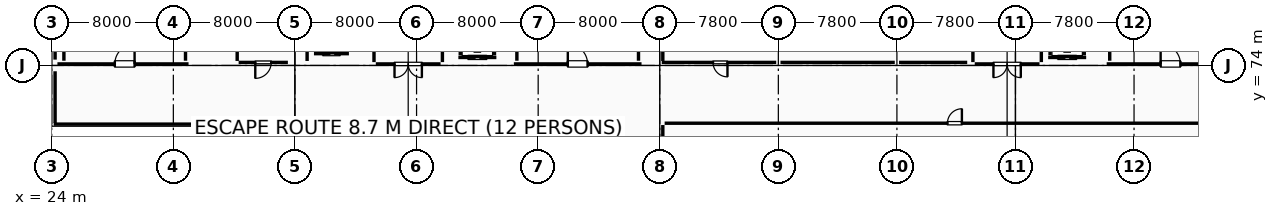
"""IFC4 building model, lengths in metres.
Left out: names, types, materials, properties, quantities, classifications, styles, units other than length and angle.
Written with IfcOpenShell. Run it as: python <this file> out.ifc"""

import sys

from ifc_helpers import new_model, si_unit, direction, frame, frame_2d, origin, origin_2d, place, context, subcontext, project, spatial, rectangle, i_section, extrude, element, fill, save


model = new_model("IFC4")
c1 = context("Model", 3, precision=1e-05, world=origin(), true_north=direction((0.0, 1.0)))
c2 = subcontext(c1, "Body", "Model", "MODEL_VIEW")
j1 = project(units=[si_unit("LENGTHUNIT", "METRE"), si_unit("PLANEANGLEUNIT", "RADIAN")], contexts=[c1])
p1 = place(None, origin())
s1 = spatial("IfcSite", under=j1, at=p1, CompositionType="ELEMENT")
p2 = place(p1, origin())
s2 = spatial("IfcBuilding", under=s1, at=p2, CompositionType="ELEMENT")
p3 = place(p2, frame((0.0, 0.0, 5.4)))
s3 = spatial("IfcBuildingStorey", under=s2, at=p3, CompositionType="ELEMENT", Elevation=5.4)
p4 = place(p3, frame((24.0, 74.0, 0.0), z_axis=(0.0, 0.0, 1.0), x_axis=(1.0, 0.0, 0.0)))
e1 = element("IfcColumn", 1, at=p4, inside=s3, PredefinedType="COLUMN", context=c2, shape_type="SweptSolid", body=[
    extrude(rectangle(XDim=0.75, YDim=0.75, at=origin_2d()), origin(), (0.0, 0.0, 1.0), 4.8),
])
p5 = place(p3, frame((40.0, 74.0, 0.0), z_axis=(0.0, 0.0, 1.0), x_axis=(1.0, 0.0, 0.0)))
e2 = element("IfcColumn", 2, at=p5, inside=s3, PredefinedType="COLUMN", context=c2, shape_type="SweptSolid", body=[
    extrude(rectangle(XDim=0.9, YDim=0.9, at=origin_2d()), origin(), (0.0, 0.0, 1.0), 4.8),
])
for number, where, z_axis, x_axis in (
    (3, (64.0, 74.0, 0.0), (0.0, 0.0, 1.0), (1.0, 0.0, 0.0)),
    (4, (71.8, 74.0, 0.0), (0.0, 0.0, 1.0), (1.0, 0.0, 0.0)),
    (5, (79.6, 74.0, 0.0), (0.0, 0.0, 1.0), (1.0, 0.0, 0.0)),
):
    element("IfcColumn", number, at=place(p3, frame(where, z_axis=z_axis, x_axis=x_axis)), inside=s3, PredefinedType="COLUMN", context=c2, shape_type="SweptSolid", body=[
        extrude(i_section(OverallWidth=0.25, OverallDepth=0.45, WebThickness=0.011, FlangeThickness=0.014, FilletRadius=0.015, at=origin_2d()), origin(), (0.0, 0.0, 1.0), 4.8),
    ])
p6 = place(p3, frame((40.0, 69.8, 0.0), z_axis=(0.0, 0.0, 1.0), x_axis=(1.0, 0.0, 0.0)))
e6 = element("IfcColumn", 6, at=p6, inside=s3, PredefinedType="COLUMN", context=c2, shape_type="SweptSolid", body=[
    extrude(i_section(OverallWidth=0.25, OverallDepth=0.35, WebThickness=0.01, FlangeThickness=0.012, FilletRadius=0.012, at=origin_2d()), origin(), (0.0, 0.0, 1.0), 4.76),
])
p7 = place(p3, frame((54.0, 69.8, 0.0), z_axis=(0.0, 0.0, 1.0), x_axis=(1.0, 0.0, 0.0)))
e7 = element("IfcColumn", 7, at=p7, inside=s3, PredefinedType="COLUMN", context=c2, shape_type="SweptSolid", body=[
    extrude(i_section(OverallWidth=0.25, OverallDepth=0.35, WebThickness=0.01, FlangeThickness=0.012, FilletRadius=0.012, at=origin_2d()), origin(), (0.0, 0.0, 1.0), 4.8),
])
for number, where, z_axis, x_axis in (
    (8, (54.24, 65.885, 0.0), (0.0, 0.0, 1.0), (0.0, 1.0, 0.0)),
    (9, (40.24, 65.885, 0.0), (0.0, 0.0, 1.0), (0.0, 1.0, 0.0)),
):
    element("IfcWall", number, at=place(p3, frame(where, z_axis=z_axis, x_axis=x_axis)), inside=s3, PredefinedType="PARAPET", context=c2, shape_type="SweptSolid", body=[
        extrude(rectangle(XDim=3.73, YDim=0.18, at=frame_2d((1.865, 0.0))), origin(), (0.0, 0.0, 1.0), 0.88),
    ])
p8 = place(p3, frame((39.867, 70.14, 0.0), z_axis=(0.0, 0.0, 1.0), x_axis=(-1.0, 0.0, 0.0)))
e10 = element("IfcWall", 10, at=p8, inside=s3, PredefinedType="ELEMENTEDWALL", context=c2, shape_type="SweptSolid", body=[
    extrude(rectangle(XDim=15.737, YDim=0.24, at=frame_2d((7.869, 0.0))), origin(), (0.0, 0.0, 1.0), 4.54),
])
p9 = place(p8, frame((7.318, 0.0, 0.95)))
e11 = element("IfcOpeningElement", 11, at=p9, cuts=e10, PredefinedType="OPENING", context=c2, shape_type="SweptSolid", body=[
    extrude(rectangle(XDim=1.1, YDim=1.2, at=frame_2d((0.55, 0.6))), frame((0.0, 0.13, 0.0), z_axis=(0.0, -1.0, 0.0), x_axis=(1.0, 0.0, 0.0)), (0.0, 0.0, 1.0), 0.26),
])
p10 = place(p3, frame((24.22, 70.21, 0.0), z_axis=(0.0, 0.0, 1.0), x_axis=(0.0, 1.0, 0.0)))
e12 = element("IfcWall", 12, at=p10, inside=s3, PredefinedType="STANDARD", context=c2, shape_type="SweptSolid", body=[
    extrude(rectangle(XDim=3.407, YDim=0.4, at=frame_2d((1.704, 0.0))), origin(), (0.0, 0.0, 1.0), 4.025),
])
p11 = place(p10, frame((1.154, 0.0, 0.95)))
e13 = element("IfcOpeningElement", 13, at=p11, cuts=e12, PredefinedType="OPENING", context=c2, shape_type="SweptSolid", body=[
    extrude(rectangle(XDim=1.1, YDim=1.5, at=frame_2d((0.55, 0.75))), frame((0.0, 0.21, 0.0), z_axis=(0.0, -1.0, 0.0), x_axis=(1.0, 0.0, 0.0)), (0.0, 0.0, 1.0), 0.42),
])
p12 = place(p3, frame((24.22, 74.383, 0.0), z_axis=(0.0, 0.0, 1.0), x_axis=(0.0, 1.0, 0.0)))
e14 = element("IfcWall", 14, at=p12, inside=s3, PredefinedType="STANDARD", context=c2, shape_type="SweptSolid", body=[
    extrude(rectangle(XDim=8.284, YDim=0.4, at=frame_2d((4.142, 0.0))), origin(), (0.0, 0.0, 1.0), 4.075),
])
p13 = place(p12, frame((3.592, 0.0, 0.95)))
e15 = element("IfcOpeningElement", 15, at=p13, cuts=e14, PredefinedType="OPENING", context=c2, shape_type="SweptSolid", body=[
    extrude(rectangle(XDim=1.1, YDim=1.8, at=frame_2d((0.55, 0.9))), frame((0.0, 0.21, 0.0), z_axis=(0.0, -1.0, 0.0), x_axis=(1.0, 0.0, 0.0)), (0.0, 0.0, 1.0), 0.42),
])
p14 = place(p3, frame((54.4, 74.1, 0.0), z_axis=(0.0, 0.0, 1.0), x_axis=(1.0, 0.0, 0.0)))
e16 = element("IfcWall", 16, at=p14, inside=s3, PredefinedType="SHEAR", context=c2, shape_type="SweptSolid", body=[
    extrude(rectangle(XDim=8.4, YDim=0.4, at=frame_2d((4.2, 0.0))), origin(), (0.0, 0.0, 1.0), 4.54),
])
p15 = place(p14, frame((3.55, 0.0, 0.0)))
e17 = element("IfcOpeningElement", 17, at=p15, cuts=e16, PredefinedType="OPENING", context=c2, shape_type="SweptSolid", body=[
    extrude(rectangle(XDim=1.3, YDim=2.15, at=frame_2d((0.65, 1.075))), frame((0.0, 0.21, 0.0), z_axis=(0.0, -1.0, 0.0), x_axis=(1.0, 0.0, 0.0)), (0.0, 0.0, 1.0), 0.42),
])
for number, where, z_axis, x_axis in (
    (18, (62.6, 74.31, 0.0), (0.0, 0.0, 1.0), (0.0, 1.0, 0.0)),
    (19, (54.6, 82.69, 0.0), (0.0, 0.0, 1.0), (0.0, -1.0, 0.0)),
):
    element("IfcWall", number, at=place(p3, frame(where, z_axis=z_axis, x_axis=x_axis)), inside=s3, PredefinedType="SHEAR", context=c2, shape_type="SweptSolid", body=[
        extrude(rectangle(XDim=8.38, YDim=0.4, at=frame_2d((4.19, 0.0))), origin(), (0.0, 0.0, 1.0), 4.54),
    ])
p16 = place(p3, frame((50.75, 74.525, 0.0), z_axis=(0.0, 0.0, 1.0), x_axis=(1.0, 0.0, 0.0)))
e20 = element("IfcWall", 20, at=p16, inside=s3, PredefinedType="STANDARD", context=c2, shape_type="SweptSolid", body=[
    extrude(rectangle(XDim=2.5, YDim=0.25, at=frame_2d((1.25, 0.0))), origin(), (0.0, 0.0, 1.0), 4.53),
])
p17 = place(p16, frame((0.65, 0.0, 0.0)))
e21 = element("IfcOpeningElement", 21, at=p17, cuts=e20, PredefinedType="OPENING", context=c2, shape_type="SweptSolid", body=[
    extrude(rectangle(XDim=1.2, YDim=2.05, at=frame_2d((0.6, 1.025))), frame((0.0, 0.135, 0.0), z_axis=(0.0, -1.0, 0.0), x_axis=(1.0, 0.0, 0.0)), (0.0, 0.0, 1.0), 0.27),
])
for number, where, z_axis, x_axis in (
    (22, (53.125, 74.66, 0.0), (0.0, 0.0, 1.0), (0.0, 1.0, 0.0)),
    (23, (50.875, 76.94, 0.0), (0.0, 0.0, 1.0), (0.0, -1.0, 0.0)),
):
    element("IfcWall", number, at=place(p3, frame(where, z_axis=z_axis, x_axis=x_axis)), inside=s3, PredefinedType="STANDARD", context=c2, shape_type="SweptSolid", body=[
        extrude(rectangle(XDim=2.28, YDim=0.25, at=frame_2d((1.14, 0.0))), origin(), (0.0, 0.0, 1.0), 4.53),
    ])
p18 = place(p3, frame((41.25, 74.775, 0.0), z_axis=(0.0, 0.0, 1.0), x_axis=(1.0, 0.0, 0.0)))
e24 = element("IfcWall", 24, at=p18, inside=s3, PredefinedType="STANDARD", context=c2, shape_type="SweptSolid", body=[
    extrude(rectangle(XDim=2.3, YDim=0.25, at=frame_2d((1.15, 0.0))), origin(), (0.0, 0.0, 1.0), 4.53),
])
p19 = place(p18, frame((0.6, 0.0, 0.0)))
e25 = element("IfcOpeningElement", 25, at=p19, cuts=e24, PredefinedType="OPENING", context=c2, shape_type="SweptSolid", body=[
    extrude(rectangle(XDim=1.1, YDim=2.15, at=frame_2d((0.55, 1.075))), frame((0.0, 0.135, 0.0), z_axis=(0.0, -1.0, 0.0), x_axis=(1.0, 0.0, 0.0)), (0.0, 0.0, 1.0), 0.27),
])
p20 = place(p3, frame((93.4, 74.1, 0.0), z_axis=(0.0, 0.0, 1.0), x_axis=(1.0, 0.0, 0.0)))
e26 = element("IfcWall", 26, at=p20, inside=s3, PredefinedType="SHEAR", context=c2, shape_type="SweptSolid", body=[
    extrude(rectangle(XDim=8.4, YDim=0.4, at=frame_2d((4.2, 0.0))), origin(), (0.0, 0.0, 1.0), 4.54),
])
p21 = place(p20, frame((3.55, 0.0, 0.0)))
e27 = element("IfcOpeningElement", 27, at=p21, cuts=e26, PredefinedType="OPENING", context=c2, shape_type="SweptSolid", body=[
    extrude(rectangle(XDim=1.3, YDim=2.15, at=frame_2d((0.65, 1.075))), frame((0.0, 0.21, 0.0), z_axis=(0.0, -1.0, 0.0), x_axis=(1.0, 0.0, 0.0)), (0.0, 0.0, 1.0), 0.42),
])
p22 = place(p3, frame((93.6, 82.69, 0.0), z_axis=(0.0, 0.0, 1.0), x_axis=(0.0, -1.0, 0.0)))
e28 = element("IfcWall", 28, at=p22, inside=s3, PredefinedType="SHEAR", context=c2, shape_type="SweptSolid", body=[
    extrude(rectangle(XDim=8.38, YDim=0.4, at=frame_2d((4.19, 0.0))), origin(), (0.0, 0.0, 1.0), 4.54),
])
p23 = place(p3, frame((89.55, 74.525, 0.0), z_axis=(0.0, 0.0, 1.0), x_axis=(1.0, 0.0, 0.0)))
e29 = element("IfcWall", 29, at=p23, inside=s3, PredefinedType="STANDARD", context=c2, shape_type="SweptSolid", body=[
    extrude(rectangle(XDim=2.5, YDim=0.25, at=frame_2d((1.25, 0.0))), origin(), (0.0, 0.0, 1.0), 4.53),
])
p24 = place(p23, frame((0.65, 0.0, 0.0)))
e30 = element("IfcOpeningElement", 30, at=p24, cuts=e29, PredefinedType="OPENING", context=c2, shape_type="SweptSolid", body=[
    extrude(rectangle(XDim=1.2, YDim=2.05, at=frame_2d((0.6, 1.025))), frame((0.0, 0.135, 0.0), z_axis=(0.0, -1.0, 0.0), x_axis=(1.0, 0.0, 0.0)), (0.0, 0.0, 1.0), 0.27),
])
for number, where, z_axis, x_axis in (
    (31, (91.925, 74.66, 0.0), (0.0, 0.0, 1.0), (0.0, 1.0, 0.0)),
    (32, (89.675, 76.94, 0.0), (0.0, 0.0, 1.0), (0.0, -1.0, 0.0)),
):
    element("IfcWall", number, at=place(p3, frame(where, z_axis=z_axis, x_axis=x_axis)), inside=s3, PredefinedType="STANDARD", context=c2, shape_type="SweptSolid", body=[
        extrude(rectangle(XDim=2.28, YDim=0.25, at=frame_2d((1.14, 0.0))), origin(), (0.0, 0.0, 1.0), 4.53),
    ])
p25 = place(p3, frame((24.374, 74.1, 0.0), z_axis=(0.0, 0.0, 1.0), x_axis=(1.0, 0.0, 0.0)))
e33 = element("IfcWall", 33, at=p25, inside=s3, PredefinedType="SHEAR", context=c2, shape_type="SweptSolid", body=[
    extrude(rectangle(XDim=8.626, YDim=0.4, at=frame_2d((4.313, 0.0))), origin(), (0.0, 0.0, 1.0), 4.54),
])
p26 = place(p25, frame((3.776, 0.0, 0.0)))
e34 = element("IfcOpeningElement", 34, at=p26, cuts=e33, PredefinedType="OPENING", context=c2, shape_type="SweptSolid", body=[
    extrude(rectangle(XDim=1.3, YDim=2.15, at=frame_2d((0.65, 1.075))), frame((0.0, 0.21, 0.0), z_axis=(0.0, -1.0, 0.0), x_axis=(1.0, 0.0, 0.0)), (0.0, 0.0, 1.0), 0.42),
])
for number, where, z_axis, x_axis in (
    (35, (32.8, 74.31, 0.0), (0.0, 0.0, 1.0), (0.0, 1.0, 0.0)),
    (36, (24.8, 82.69, 0.0), (0.0, 0.0, 1.0), (0.0, -1.0, 0.0)),
):
    element("IfcWall", number, at=place(p3, frame(where, z_axis=z_axis, x_axis=x_axis)), inside=s3, PredefinedType="SHEAR", context=c2, shape_type="SweptSolid", body=[
        extrude(rectangle(XDim=8.38, YDim=0.4, at=frame_2d((4.19, 0.0))), origin(), (0.0, 0.0, 1.0), 4.54),
    ])
for number, where, z_axis, x_axis in (
    (37, (45.2, 74.22, 0.0), (0.0, 0.0, 1.0), (0.0, 1.0, 0.0)),
    (38, (49.7, 77.58, 0.0), (0.0, 0.0, 1.0), (0.0, -1.0, 0.0)),
):
    element("IfcWall", number, at=place(p3, frame(where, z_axis=z_axis, x_axis=x_axis)), inside=s3, PredefinedType="PARTITIONING", context=c2, shape_type="SweptSolid", body=[
        extrude(rectangle(XDim=3.36, YDim=0.2, at=frame_2d((1.68, 0.0))), origin(), (0.0, 0.0, 1.0), 4.53),
    ])
p27 = place(p3, frame((49.58, 74.1, 0.0), z_axis=(0.0, 0.0, 1.0), x_axis=(-1.0, 0.0, 0.0)))
e39 = element("IfcWall", 39, at=p27, inside=s3, PredefinedType="PARTITIONING", context=c2, shape_type="SweptSolid", body=[
    extrude(rectangle(XDim=4.26, YDim=0.2, at=frame_2d((2.13, 0.0))), origin(), (0.0, 0.0, 1.0), 4.53),
])
p28 = place(p27, frame((1.23, 0.0, 0.0)))
e40 = element("IfcOpeningElement", 40, at=p28, cuts=e39, PredefinedType="OPENING", context=c2, shape_type="SweptSolid", body=[
    extrude(rectangle(XDim=1.8, YDim=2.15, at=frame_2d((0.9, 1.075))), frame((0.0, 0.11, 0.0), z_axis=(0.0, -1.0, 0.0), x_axis=(1.0, 0.0, 0.0)), (0.0, 0.0, 1.0), 0.22),
])
for number, where, z_axis, x_axis in (
    (41, (84.6, 74.22, 0.0), (0.0, 0.0, 1.0), (0.0, 1.0, 0.0)),
    (42, (89.1, 77.58, 0.0), (0.0, 0.0, 1.0), (0.0, -1.0, 0.0)),
):
    element("IfcWall", number, at=place(p3, frame(where, z_axis=z_axis, x_axis=x_axis)), inside=s3, PredefinedType="PARTITIONING", context=c2, shape_type="SweptSolid", body=[
        extrude(rectangle(XDim=3.36, YDim=0.2, at=frame_2d((1.68, 0.0))), origin(), (0.0, 0.0, 1.0), 4.53),
    ])
p29 = place(p3, frame((88.98, 74.1, 0.0), z_axis=(0.0, 0.0, 1.0), x_axis=(-1.0, 0.0, 0.0)))
e43 = element("IfcWall", 43, at=p29, inside=s3, PredefinedType="PARTITIONING", context=c2, shape_type="SweptSolid", body=[
    extrude(rectangle(XDim=4.26, YDim=0.2, at=frame_2d((2.13, 0.0))), origin(), (0.0, 0.0, 1.0), 4.53),
])
p30 = place(p29, frame((1.23, 0.0, 0.0)))
e44 = element("IfcOpeningElement", 44, at=p30, cuts=e43, PredefinedType="OPENING", context=c2, shape_type="SweptSolid", body=[
    extrude(rectangle(XDim=1.8, YDim=2.15, at=frame_2d((0.9, 1.075))), frame((0.0, 0.11, 0.0), z_axis=(0.0, -1.0, 0.0), x_axis=(1.0, 0.0, 0.0)), (0.0, 0.0, 1.0), 0.22),
])
p31 = place(p3, frame((40.8, 82.666, 0.0), z_axis=(0.0, 0.0, 1.0), x_axis=(0.0, -1.0, 0.0)))
e45 = element("IfcWall", 45, at=p31, inside=s3, PredefinedType="PARTITIONING", context=c2, shape_type="SweptSolid", body=[
    extrude(rectangle(XDim=8.371, YDim=0.15, at=frame_2d((4.186, 0.0))), origin(), (0.0, 0.0, 1.0), 4.53),
])
p32 = place(p3, frame((39.535, 74.2, 0.0), z_axis=(0.0, 0.0, 1.0), x_axis=(-1.0, 0.0, 0.0)))
e46 = element("IfcWall", 46, at=p32, inside=s3, PredefinedType="PARTITIONING", context=c2, shape_type="SweptSolid", body=[
    extrude(rectangle(XDim=3.24, YDim=0.15, at=frame_2d((1.62, 0.0))), origin(), (0.0, 0.0, 1.0), 4.53),
])
p33 = place(p32, frame((1.095, 0.0, 0.0)))
e47 = element("IfcOpeningElement", 47, at=p33, cuts=e46, PredefinedType="OPENING", context=c2, shape_type="SweptSolid", body=[
    extrude(rectangle(XDim=1.05, YDim=2.15, at=frame_2d((0.525, 1.075))), frame((0.0, 0.085, 0.0), z_axis=(0.0, -1.0, 0.0), x_axis=(1.0, 0.0, 0.0)), (0.0, 0.0, 1.0), 0.17),
])
p34 = place(p3, frame((36.2, 74.295, 0.0), z_axis=(0.0, 0.0, 1.0), x_axis=(0.0, 1.0, 0.0)))
e48 = element("IfcWall", 48, at=p34, inside=s3, PredefinedType="PARTITIONING", context=c2, shape_type="SweptSolid", body=[
    extrude(rectangle(XDim=8.371, YDim=0.15, at=frame_2d((4.186, 0.0))), origin(), (0.0, 0.0, 1.0), 4.53),
])
p35 = place(p3, frame((64.2, 74.295, 0.0), z_axis=(0.0, 0.0, 1.0), x_axis=(0.0, 1.0, 0.0)))
e49 = element("IfcWall", 49, at=p35, inside=s3, PredefinedType="PARTITIONING", context=c2, shape_type="SweptSolid", body=[
    extrude(rectangle(XDim=8.476, YDim=0.15, at=frame_2d((4.238, 0.0))), origin(), (0.0, 0.0, 1.0), 4.12),
])
p36 = place(p3, frame((84.225, 74.2, 0.0), z_axis=(0.0, 0.0, 1.0), x_axis=(-1.0, 0.0, 0.0)))
e50 = element("IfcWall", 50, at=p36, inside=s3, PredefinedType="PARTITIONING", context=c2, shape_type="SweptSolid", body=[
    extrude(rectangle(XDim=4.485, YDim=0.15, at=frame_2d((2.243, 0.0))), origin(), (0.0, 0.0, 1.0), 4.53),
])
p37 = place(p3, frame((79.46, 74.2, 0.0), z_axis=(0.0, 0.0, 1.0), x_axis=(-1.0, 0.0, 0.0)))
e51 = element("IfcWall", 51, at=p37, inside=s3, PredefinedType="PARTITIONING", context=c2, shape_type="SweptSolid", body=[
    extrude(rectangle(XDim=7.52, YDim=0.15, at=frame_2d((3.76, 0.0))), origin(), (0.0, 0.0, 1.0), 3.67),
])
p38 = place(p3, frame((71.66, 74.2, 0.0), z_axis=(0.0, 0.0, 1.0), x_axis=(-1.0, 0.0, 0.0)))
e52 = element("IfcWall", 52, at=p38, inside=s3, PredefinedType="PARTITIONING", context=c2, shape_type="SweptSolid", body=[
    extrude(rectangle(XDim=7.531, YDim=0.15, at=frame_2d((3.766, 0.0))), origin(), (0.0, 0.0, 1.0), 3.52),
])
p39 = place(p38, frame((3.207, 0.0, 0.0)))
e53 = element("IfcOpeningElement", 53, at=p39, cuts=e52, PredefinedType="OPENING", context=c2, shape_type="SweptSolid", body=[
    extrude(rectangle(XDim=0.95, YDim=2.15, at=frame_2d((0.475, 1.075))), frame((0.0, 0.085, 0.0), z_axis=(0.0, -1.0, 0.0), x_axis=(1.0, 0.0, 0.0)), (0.0, 0.0, 1.0), 0.17),
])
p40 = place(p3, frame((64.32, 70.2, 0.0), z_axis=(0.0, 0.0, 1.0), x_axis=(1.0, 0.0, 0.0)))
e54 = element("IfcWall", 54, at=p40, inside=s3, PredefinedType="PARTITIONING", context=c2, shape_type="SweptSolid", body=[
    extrude(rectangle(XDim=38.356, YDim=0.2, at=frame_2d((19.178, 0.0))), origin(), (0.0, 0.0, 1.0), 4.53),
])
p41 = place(p40, frame((18.605, 0.0, 0.0)))
e55 = element("IfcOpeningElement", 55, at=p41, cuts=e54, PredefinedType="OPENING", context=c2, shape_type="SweptSolid", body=[
    extrude(rectangle(XDim=0.95, YDim=2.15, at=frame_2d((0.475, 1.075))), frame((0.0, 0.11, 0.0), z_axis=(0.0, -1.0, 0.0), x_axis=(1.0, 0.0, 0.0)), (0.0, 0.0, 1.0), 0.22),
])
p42 = place(p3, frame((64.2, 65.24, 0.0), z_axis=(0.0, 0.0, 1.0), x_axis=(0.0, 1.0, 0.0)))
e56 = element("IfcWall", 56, at=p42, inside=s3, PredefinedType="PARTITIONING", context=c2, shape_type="SweptSolid", body=[
    extrude(rectangle(XDim=4.84, YDim=0.2, at=frame_2d((2.42, 0.0))), origin(), (0.0, 0.0, 1.0), 4.07),
])
p43 = place(p42, frame((1.895, 0.0, 0.0)))
e57 = element("IfcOpeningElement", 57, at=p43, cuts=e56, PredefinedType="OPENING", context=c2, shape_type="SweptSolid", body=[
    extrude(rectangle(XDim=1.05, YDim=2.15, at=frame_2d((0.525, 1.075))), frame((0.0, 0.11, 0.0), z_axis=(0.0, -1.0, 0.0), x_axis=(1.0, 0.0, 0.0)), (0.0, 0.0, 1.0), 0.22),
])
p44 = place(p9, origin())
e58 = element("IfcWindow", 58, at=p44, inside=s3, PartitioningType="SINGLE_PANEL", PredefinedType="WINDOW", context=c2, shape_type="SweptSolid", body=[
    extrude(rectangle(XDim=1.1, YDim=1.2, at=frame_2d((0.55, 0.6))), frame((0.0, 0.03, 0.0), z_axis=(0.0, -1.0, 0.0), x_axis=(1.0, 0.0, 0.0)), (0.0, 0.0, 1.0), 0.06),
])
fill(e11, e58)
p45 = place(p11, origin())
e59 = element("IfcWindow", 59, at=p45, inside=s3, PartitioningType="SINGLE_PANEL", PredefinedType="WINDOW", context=c2, shape_type="SweptSolid", body=[
    extrude(rectangle(XDim=1.1, YDim=1.5, at=frame_2d((0.55, 0.75))), frame((0.0, 0.03, 0.0), z_axis=(0.0, -1.0, 0.0), x_axis=(1.0, 0.0, 0.0)), (0.0, 0.0, 1.0), 0.06),
])
fill(e13, e59)
p46 = place(p15, origin())
e60 = element("IfcDoor", 60, at=p46, inside=s3, OperationType="SINGLE_SWING_LEFT", PredefinedType="DOOR", context=c2, shape_type="SweptSolid", body=[
    extrude(rectangle(XDim=1.3, YDim=2.15, at=frame_2d((0.65, 1.075))), frame((0.0, 0.025, 0.0), z_axis=(0.0, -1.0, 0.0), x_axis=(1.0, 0.0, 0.0)), (0.0, 0.0, 1.0), 0.05),
])
fill(e17, e60)
p47 = place(p17, origin())
e61 = element("IfcDoor", 61, at=p47, inside=s3, OperationType="DOUBLE_DOOR_SLIDING", PredefinedType="DOOR", context=c2, shape_type="SweptSolid", body=[
    extrude(rectangle(XDim=1.2, YDim=2.05, at=frame_2d((0.6, 1.025))), frame((0.0, 0.025, 0.0), z_axis=(0.0, -1.0, 0.0), x_axis=(1.0, 0.0, 0.0)), (0.0, 0.0, 1.0), 0.05),
])
fill(e21, e61)
p48 = place(p19, origin())
e62 = element("IfcDoor", 62, at=p48, inside=s3, OperationType="DOUBLE_DOOR_SLIDING", PredefinedType="DOOR", context=c2, shape_type="SweptSolid", body=[
    extrude(rectangle(XDim=1.1, YDim=2.15, at=frame_2d((0.55, 1.075))), frame((0.0, 0.025, 0.0), z_axis=(0.0, -1.0, 0.0), x_axis=(1.0, 0.0, 0.0)), (0.0, 0.0, 1.0), 0.05),
])
fill(e25, e62)
p49 = place(p21, origin())
e63 = element("IfcDoor", 63, at=p49, inside=s3, OperationType="SINGLE_SWING_LEFT", PredefinedType="DOOR", context=c2, shape_type="SweptSolid", body=[
    extrude(rectangle(XDim=1.3, YDim=2.15, at=frame_2d((0.65, 1.075))), frame((0.0, 0.025, 0.0), z_axis=(0.0, -1.0, 0.0), x_axis=(1.0, 0.0, 0.0)), (0.0, 0.0, 1.0), 0.05),
])
fill(e27, e63)
p50 = place(p24, origin())
e64 = element("IfcDoor", 64, at=p50, inside=s3, OperationType="DOUBLE_DOOR_SLIDING", PredefinedType="DOOR", context=c2, shape_type="SweptSolid", body=[
    extrude(rectangle(XDim=1.2, YDim=2.05, at=frame_2d((0.6, 1.025))), frame((0.0, 0.025, 0.0), z_axis=(0.0, -1.0, 0.0), x_axis=(1.0, 0.0, 0.0)), (0.0, 0.0, 1.0), 0.05),
])
fill(e30, e64)
p51 = place(p26, origin())
e65 = element("IfcDoor", 65, at=p51, inside=s3, OperationType="SINGLE_SWING_RIGHT", PredefinedType="DOOR", context=c2, shape_type="SweptSolid", body=[
    extrude(rectangle(XDim=1.3, YDim=2.15, at=frame_2d((0.65, 1.075))), frame((0.0, 0.025, 0.0), z_axis=(0.0, -1.0, 0.0), x_axis=(1.0, 0.0, 0.0)), (0.0, 0.0, 1.0), 0.05),
])
fill(e34, e65)
p52 = place(p28, origin())
e66 = element("IfcDoor", 66, at=p52, inside=s3, OperationType="DOUBLE_DOOR_SINGLE_SWING", PredefinedType="DOOR", context=c2, shape_type="SweptSolid", body=[
    extrude(rectangle(XDim=1.8, YDim=2.15, at=frame_2d((0.9, 1.075))), frame((0.0, 0.025, 0.0), z_axis=(0.0, -1.0, 0.0), x_axis=(1.0, 0.0, 0.0)), (0.0, 0.0, 1.0), 0.05),
])
fill(e40, e66)
p53 = place(p30, origin())
e67 = element("IfcDoor", 67, at=p53, inside=s3, OperationType="DOUBLE_DOOR_SINGLE_SWING", PredefinedType="DOOR", context=c2, shape_type="SweptSolid", body=[
    extrude(rectangle(XDim=1.8, YDim=2.15, at=frame_2d((0.9, 1.075))), frame((0.0, 0.025, 0.0), z_axis=(0.0, -1.0, 0.0), x_axis=(1.0, 0.0, 0.0)), (0.0, 0.0, 1.0), 0.05),
])
fill(e44, e67)
p54 = place(p33, origin())
e68 = element("IfcDoor", 68, at=p54, inside=s3, OperationType="SINGLE_SWING_RIGHT", PredefinedType="DOOR", context=c2, shape_type="SweptSolid", body=[
    extrude(rectangle(XDim=1.05, YDim=2.15, at=frame_2d((0.525, 1.075))), frame((0.0, 0.025, 0.0), z_axis=(0.0, -1.0, 0.0), x_axis=(1.0, 0.0, 0.0)), (0.0, 0.0, 1.0), 0.05),
])
fill(e47, e68)
p55 = place(p39, origin())
e69 = element("IfcDoor", 69, at=p55, inside=s3, OperationType="SINGLE_SWING_LEFT", PredefinedType="DOOR", context=c2, shape_type="SweptSolid", body=[
    extrude(rectangle(XDim=0.95, YDim=2.15, at=frame_2d((0.475, 1.075))), frame((0.0, 0.025, 0.0), z_axis=(0.0, -1.0, 0.0), x_axis=(1.0, 0.0, 0.0)), (0.0, 0.0, 1.0), 0.05),
])
fill(e53, e69)
p56 = place(p41, origin())
e70 = element("IfcDoor", 70, at=p56, inside=s3, OperationType="SINGLE_SWING_RIGHT", PredefinedType="DOOR", context=c2, shape_type="SweptSolid", body=[
    extrude(rectangle(XDim=0.95, YDim=2.15, at=frame_2d((0.475, 1.075))), frame((0.0, 0.025, 0.0), z_axis=(0.0, -1.0, 0.0), x_axis=(1.0, 0.0, 0.0)), (0.0, 0.0, 1.0), 0.05),
])
fill(e55, e70)
save(model, sys.argv[1])
